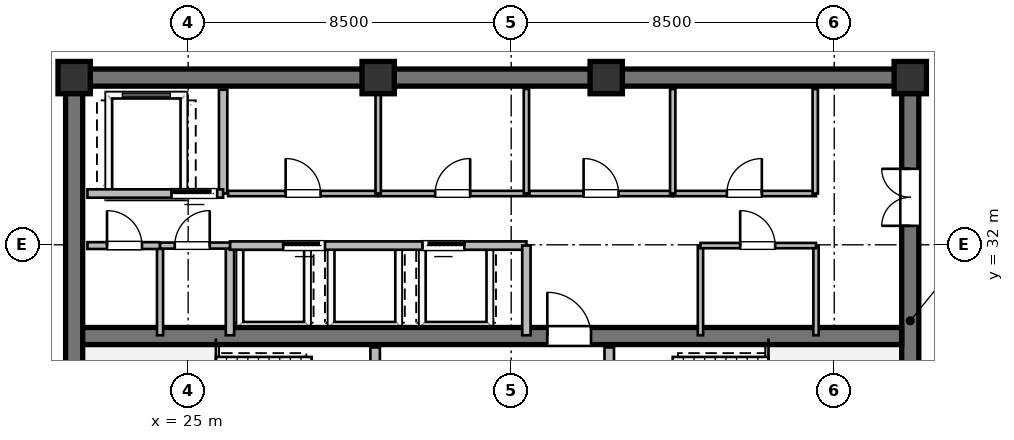
"""IFC4 building model, lengths in metres.
Left out: names, types, materials, properties, quantities, classifications, styles, units other than length and angle.
Written with IfcOpenShell. Run it as: python <this file> out.ifc"""

import sys

from ifc_helpers import new_model, si_unit, direction, frame, frame_2d, origin, origin_2d, place, context, subcontext, project, spatial, rectangle, extrude, element, fill, save


model = new_model("IFC4")
c1 = context("Model", 3, precision=1e-05, world=origin(), true_north=direction((0.0, 1.0)))
c2 = subcontext(c1, "Body", "Model", "MODEL_VIEW")
j1 = project(units=[si_unit("LENGTHUNIT", "METRE"), si_unit("PLANEANGLEUNIT", "RADIAN")], contexts=[c1])
p1 = place(None, origin())
s1 = spatial("IfcSite", under=j1, at=p1, CompositionType="ELEMENT")
p2 = place(p1, origin())
s2 = spatial("IfcBuilding", under=s1, at=p2, CompositionType="ELEMENT")
p3 = place(p2, frame((0.0, 0.0, 213.6)))
s3 = spatial("IfcBuildingStorey", under=s2, at=p3, CompositionType="ELEMENT", Elevation=213.6)
p4 = place(p3, frame((21.775, 36.4, 0.0), z_axis=(0.0, 0.0, 1.0), x_axis=(1.0, 0.0, 0.0)))
e1 = element("IfcWall", 1, at=p4, inside=s3, PredefinedType="SHEAR", context=c2, shape_type="SweptSolid", body=[
    extrude(rectangle(XDim=22.45, YDim=0.45, at=frame_2d((11.225, 0.0))), origin(), (0.0, 0.0, 1.0), 3.36),
])
p5 = place(p3, frame((22.0, 23.825, 0.0), z_axis=(0.0, 0.0, 1.0), x_axis=(0.0, 1.0, 0.0)))
e2 = element("IfcWall", 2, at=p5, inside=s3, PredefinedType="SHEAR", context=c2, shape_type="SweptSolid", body=[
    extrude(rectangle(XDim=12.35, YDim=0.45, at=frame_2d((6.175, 0.0))), origin(), (0.0, 0.0, 1.0), 3.36),
])
p6 = place(p3, frame((44.0, 23.825, 0.0), z_axis=(0.0, 0.0, 1.0), x_axis=(0.0, 1.0, 0.0)))
e3 = element("IfcWall", 3, at=p6, inside=s3, PredefinedType="SHEAR", context=c2, shape_type="SweptSolid", body=[
    extrude(rectangle(XDim=12.35, YDim=0.45, at=frame_2d((6.175, 0.0))), origin(), (0.0, 0.0, 1.0), 3.36),
])
p7 = place(p6, frame((8.675, 0.0, 0.0)))
e4 = element("IfcOpeningElement", 4, at=p7, cuts=e3, PredefinedType="OPENING", context=c2, shape_type="SweptSolid", body=[
    extrude(rectangle(XDim=1.5, YDim=2.15, at=frame_2d((0.75, 1.075))), frame((0.0, 0.235, 0.0), z_axis=(0.0, -1.0, 0.0), x_axis=(1.0, 0.0, 0.0)), (0.0, 0.0, 1.0), 0.47),
])
p8 = place(p3, frame((22.225, 29.6, 0.0), z_axis=(0.0, 0.0, 1.0), x_axis=(1.0, 0.0, 0.0)))
e5 = element("IfcWall", 5, at=p8, inside=s3, PredefinedType="SHEAR", context=c2, shape_type="SweptSolid", body=[
    extrude(rectangle(XDim=21.55, YDim=0.45, at=frame_2d((10.775, 0.0))), origin(), (0.0, 0.0, 1.0), 3.36),
])
p9 = place(p8, frame((12.225, 0.0, 0.0)))
e6 = element("IfcOpeningElement", 6, at=p9, cuts=e5, PredefinedType="OPENING", context=c2, shape_type="SweptSolid", body=[
    extrude(rectangle(XDim=1.15, YDim=2.1, at=frame_2d((0.575, 1.05))), frame((0.0, 0.235, 0.0), z_axis=(0.0, -1.0, 0.0), x_axis=(1.0, 0.0, 0.0)), (0.0, 0.0, 1.0), 0.47),
])
for number, where, z_axis, x_axis in (
    (7, (44.0, 36.4, 0.0), (0.0, 0.0, 1.0), (1.0, 0.0, 0.0)),
    (8, (36.0, 36.4, 0.0), (0.0, 0.0, 1.0), (1.0, 0.0, 0.0)),
    (9, (30.0, 36.4, 0.0), (0.0, 0.0, 1.0), (1.0, 0.0, 0.0)),
    (10, (22.0, 36.4, 0.0), (0.0, 0.0, 1.0), (1.0, 0.0, 0.0)),
):
    element("IfcColumn", number, at=place(p3, frame(where, z_axis=z_axis, x_axis=x_axis)), inside=s3, PredefinedType="COLUMN", context=c2, shape_type="SweptSolid", body=[
        extrude(rectangle(XDim=0.85, YDim=0.85, at=origin_2d()), origin(), (0.0, 0.0, 1.0), 3.6),
    ])
p10 = place(p3, frame((29.92, 23.9, 0.0), z_axis=(0.0, 0.0, 1.0), x_axis=(0.0, 1.0, 0.0)))
e11 = element("IfcWall", 11, at=p10, inside=s3, PredefinedType="SOLIDWALL", context=c2, shape_type="SweptSolid", body=[
    extrude(rectangle(XDim=5.4, YDim=0.25, at=frame_2d((2.7, 0.0))), origin(), (0.0, 0.0, 1.0), 3.36),
])
p11 = place(p10, frame((3.421, 0.0, 0.0)))
e12 = element("IfcOpeningElement", 12, at=p11, cuts=e11, PredefinedType="OPENING", context=c2, shape_type="SweptSolid", body=[
    extrude(rectangle(XDim=1.15, YDim=2.1, at=frame_2d((0.575, 1.05))), frame((0.0, 0.135, 0.0), z_axis=(0.0, -1.0, 0.0), x_axis=(1.0, 0.0, 0.0)), (0.0, 0.0, 1.0), 0.27),
])
p12 = place(p3, frame((36.08, 23.9, 0.0), z_axis=(0.0, 0.0, 1.0), x_axis=(0.0, 1.0, 0.0)))
e13 = element("IfcWall", 13, at=p12, inside=s3, PredefinedType="SOLIDWALL", context=c2, shape_type="SweptSolid", body=[
    extrude(rectangle(XDim=5.4, YDim=0.25, at=frame_2d((2.7, 0.0))), origin(), (0.0, 0.0, 1.0), 3.36),
])
p13 = place(p12, frame((3.421, 0.0, 0.0)))
e14 = element("IfcOpeningElement", 14, at=p13, cuts=e13, PredefinedType="OPENING", context=c2, shape_type="SweptSolid", body=[
    extrude(rectangle(XDim=1.15, YDim=2.1, at=frame_2d((0.575, 1.05))), frame((0.0, 0.135, 0.0), z_axis=(0.0, -1.0, 0.0), x_axis=(1.0, 0.0, 0.0)), (0.0, 0.0, 1.0), 0.27),
])
p14 = place(p3, frame((25.92, 33.35, 0.0), z_axis=(0.0, 0.0, 1.0), x_axis=(0.0, 1.0, 0.0)))
e15 = element("IfcWall", 15, at=p14, inside=s3, PredefinedType="SOLIDWALL", context=c2, shape_type="SweptSolid", body=[
    extrude(rectangle(XDim=2.73, YDim=0.22, at=frame_2d((1.365, 0.0))), origin(), (0.0, 0.0, 1.0), 3.36),
])
p15 = place(p3, frame((22.35, 33.35, 0.0), z_axis=(0.0, 0.0, 1.0), x_axis=(1.0, 0.0, 0.0)))
e16 = element("IfcWall", 16, at=p15, inside=s3, PredefinedType="SOLIDWALL", context=c2, shape_type="SweptSolid", body=[
    extrude(rectangle(XDim=3.57, YDim=0.22, at=frame_2d((1.785, 0.0))), origin(), (0.0, 0.0, 1.0), 3.36),
])
p16 = place(p15, frame((2.213, 0.0, 0.0)))
e17 = element("IfcOpeningElement", 17, at=p16, cuts=e16, PredefinedType="OPENING", context=c2, shape_type="SweptSolid", body=[
    extrude(rectangle(XDim=1.2, YDim=2.1, at=frame_2d((0.6, 1.05))), frame((0.0, 0.12, 0.0), z_axis=(0.0, -1.0, 0.0), x_axis=(1.0, 0.0, 0.0)), (0.0, 0.0, 1.0), 0.24),
])
p17 = place(p3, frame((26.1, 29.62, 0.0), z_axis=(0.0, 0.0, 1.0), x_axis=(0.0, 1.0, 0.0)))
e18 = element("IfcWall", 18, at=p17, inside=s3, PredefinedType="SOLIDWALL", context=c2, shape_type="SweptSolid", body=[
    extrude(rectangle(XDim=2.36, YDim=0.22, at=frame_2d((1.18, 0.0))), origin(), (0.0, 0.0, 1.0), 3.36),
])
p18 = place(p3, frame((26.1, 31.98, 0.0), z_axis=(0.0, 0.0, 1.0), x_axis=(1.0, 0.0, 0.0)))
e19 = element("IfcWall", 19, at=p18, inside=s3, PredefinedType="SOLIDWALL", context=c2, shape_type="SweptSolid", body=[
    extrude(rectangle(XDim=7.8, YDim=0.22, at=frame_2d((3.9, 0.0))), origin(), (0.0, 0.0, 1.0), 3.36),
])
p19 = place(p18, frame((1.4, 0.0, 0.0)))
e20 = element("IfcOpeningElement", 20, at=p19, cuts=e19, PredefinedType="OPENING", context=c2, shape_type="SweptSolid", body=[
    extrude(rectangle(XDim=1.1, YDim=2.1, at=frame_2d((0.55, 1.05))), frame((0.0, 0.12, 0.0), z_axis=(0.0, -1.0, 0.0), x_axis=(1.0, 0.0, 0.0)), (0.0, 0.0, 1.0), 0.24),
])
p20 = place(p18, frame((5.066, 0.0, 0.0)))
e21 = element("IfcOpeningElement", 21, at=p20, cuts=e19, PredefinedType="OPENING", context=c2, shape_type="SweptSolid", body=[
    extrude(rectangle(XDim=1.1, YDim=2.1, at=frame_2d((0.55, 1.05))), frame((0.0, 0.12, 0.0), z_axis=(0.0, -1.0, 0.0), x_axis=(1.0, 0.0, 0.0)), (0.0, 0.0, 1.0), 0.24),
])
p21 = place(p3, frame((33.9, 29.62, 0.0), z_axis=(0.0, 0.0, 1.0), x_axis=(0.0, 1.0, 0.0)))
e22 = element("IfcWall", 22, at=p21, inside=s3, PredefinedType="SOLIDWALL", context=c2, shape_type="SweptSolid", body=[
    extrude(rectangle(XDim=2.36, YDim=0.22, at=frame_2d((1.18, 0.0))), origin(), (0.0, 0.0, 1.0), 3.36),
])
p22 = place(p3, frame((26.05, 33.35, 0.0), z_axis=(0.0, 0.0, 1.0), x_axis=(1.0, 0.0, 0.0)))
e23 = element("IfcWall", 23, at=p22, inside=s3, PredefinedType="PARTITIONING", context=c2, shape_type="SweptSolid", body=[
    extrude(rectangle(XDim=3.95, YDim=0.14, at=frame_2d((1.975, 0.0))), origin(), (0.0, 0.0, 1.0), 3.36),
])
p23 = place(p22, frame((1.515, 0.0, 0.0)))
e24 = element("IfcOpeningElement", 24, at=p23, cuts=e23, PredefinedType="OPENING", context=c2, shape_type="SweptSolid", body=[
    extrude(rectangle(XDim=0.92, YDim=2.1, at=frame_2d((0.46, 1.05))), frame((0.0, 0.08, 0.0), z_axis=(0.0, -1.0, 0.0), x_axis=(1.0, 0.0, 0.0)), (0.0, 0.0, 1.0), 0.16),
])
p24 = place(p3, frame((30.0, 33.35, 0.0), z_axis=(0.0, 0.0, 1.0), x_axis=(1.0, 0.0, 0.0)))
e25 = element("IfcWall", 25, at=p24, inside=s3, PredefinedType="PARTITIONING", context=c2, shape_type="SweptSolid", body=[
    extrude(rectangle(XDim=3.92, YDim=0.14, at=frame_2d((1.96, 0.0))), origin(), (0.0, 0.0, 1.0), 3.36),
])
p25 = place(p24, frame((1.5, 0.0, 0.0)))
e26 = element("IfcOpeningElement", 26, at=p25, cuts=e25, PredefinedType="OPENING", context=c2, shape_type="SweptSolid", body=[
    extrude(rectangle(XDim=0.92, YDim=2.1, at=frame_2d((0.46, 1.05))), frame((0.0, 0.08, 0.0), z_axis=(0.0, -1.0, 0.0), x_axis=(1.0, 0.0, 0.0)), (0.0, 0.0, 1.0), 0.16),
])
for number, where, z_axis, x_axis in (
    (27, (30.0, 33.35, 0.0), (0.0, 0.0, 1.0), (0.0, 1.0, 0.0)),
    (28, (33.9, 33.35, 0.0), (0.0, 0.0, 1.0), (0.0, 1.0, 0.0)),
):
    element("IfcWall", number, at=place(p3, frame(where, z_axis=z_axis, x_axis=x_axis)), inside=s3, PredefinedType="PARTITIONING", context=c2, shape_type="SweptSolid", body=[
        extrude(rectangle(XDim=2.75, YDim=0.14, at=frame_2d((1.375, 0.0))), origin(), (0.0, 0.0, 1.0), 3.36),
    ])
p26 = place(p3, frame((33.98, 33.35, 0.0), z_axis=(0.0, 0.0, 1.0), x_axis=(1.0, 0.0, 0.0)))
e29 = element("IfcWall", 29, at=p26, inside=s3, PredefinedType="PARTITIONING", context=c2, shape_type="SweptSolid", body=[
    extrude(rectangle(XDim=3.77, YDim=0.14, at=frame_2d((1.885, 0.0))), origin(), (0.0, 0.0, 1.0), 3.36),
])
p27 = place(p26, frame((1.425, 0.0, 0.0)))
e30 = element("IfcOpeningElement", 30, at=p27, cuts=e29, PredefinedType="OPENING", context=c2, shape_type="SweptSolid", body=[
    extrude(rectangle(XDim=0.92, YDim=2.1, at=frame_2d((0.46, 1.05))), frame((0.0, 0.08, 0.0), z_axis=(0.0, -1.0, 0.0), x_axis=(1.0, 0.0, 0.0)), (0.0, 0.0, 1.0), 0.16),
])
p28 = place(p3, frame((37.75, 33.35, 0.0), z_axis=(0.0, 0.0, 1.0), x_axis=(1.0, 0.0, 0.0)))
e31 = element("IfcWall", 31, at=p28, inside=s3, PredefinedType="PARTITIONING", context=c2, shape_type="SweptSolid", body=[
    extrude(rectangle(XDim=3.77, YDim=0.14, at=frame_2d((1.885, 0.0))), origin(), (0.0, 0.0, 1.0), 3.36),
])
p29 = place(p28, frame((1.425, 0.0, 0.0)))
e32 = element("IfcOpeningElement", 32, at=p29, cuts=e31, PredefinedType="OPENING", context=c2, shape_type="SweptSolid", body=[
    extrude(rectangle(XDim=0.92, YDim=2.1, at=frame_2d((0.46, 1.05))), frame((0.0, 0.08, 0.0), z_axis=(0.0, -1.0, 0.0), x_axis=(1.0, 0.0, 0.0)), (0.0, 0.0, 1.0), 0.16),
])
for number, where, z_axis, x_axis in (
    (33, (37.75, 33.35, 0.0), (0.0, 0.0, 1.0), (0.0, 1.0, 0.0)),
    (34, (41.5, 33.35, 0.0), (0.0, 0.0, 1.0), (0.0, 1.0, 0.0)),
):
    element("IfcWall", number, at=place(p3, frame(where, z_axis=z_axis, x_axis=x_axis)), inside=s3, PredefinedType="PARTITIONING", context=c2, shape_type="SweptSolid", body=[
        extrude(rectangle(XDim=2.75, YDim=0.14, at=frame_2d((1.375, 0.0))), origin(), (0.0, 0.0, 1.0), 3.36),
    ])
p30 = place(p3, frame((24.26, 29.62, 0.0), z_axis=(0.0, 0.0, 1.0), x_axis=(0.0, 1.0, 0.0)))
e35 = element("IfcWall", 35, at=p30, inside=s3, PredefinedType="PLUMBINGWALL", context=c2, shape_type="SweptSolid", body=[
    extrude(rectangle(XDim=2.36, YDim=0.16, at=frame_2d((1.18, 0.0))), origin(), (0.0, 0.0, 1.0), 3.36),
])
p31 = place(p3, frame((22.35, 31.98, 0.0), z_axis=(0.0, 0.0, 1.0), x_axis=(1.0, 0.0, 0.0)))
e36 = element("IfcWall", 36, at=p31, inside=s3, PredefinedType="PARTITIONING", context=c2, shape_type="SweptSolid", body=[
    extrude(rectangle(XDim=1.91, YDim=0.18, at=frame_2d((0.955, 0.0))), origin(), (0.0, 0.0, 1.0), 3.36),
])
p32 = place(p31, frame((0.515, 0.0, 0.0)))
e37 = element("IfcOpeningElement", 37, at=p32, cuts=e36, PredefinedType="OPENING", context=c2, shape_type="SweptSolid", body=[
    extrude(rectangle(XDim=0.92, YDim=2.1, at=frame_2d((0.46, 1.05))), frame((0.0, 0.1, 0.0), z_axis=(0.0, -1.0, 0.0), x_axis=(1.0, 0.0, 0.0)), (0.0, 0.0, 1.0), 0.2),
])
p33 = place(p3, frame((24.26, 31.98, 0.0), z_axis=(0.0, 0.0, 1.0), x_axis=(1.0, 0.0, 0.0)))
e38 = element("IfcWall", 38, at=p33, inside=s3, PredefinedType="PLUMBINGWALL", context=c2, shape_type="SweptSolid", body=[
    extrude(rectangle(XDim=1.84, YDim=0.16, at=frame_2d((0.92, 0.0))), origin(), (0.0, 0.0, 1.0), 3.36),
])
p34 = place(p33, frame((0.388, 0.0, 0.0)))
e39 = element("IfcOpeningElement", 39, at=p34, cuts=e38, PredefinedType="OPENING", context=c2, shape_type="SweptSolid", body=[
    extrude(rectangle(XDim=0.92, YDim=2.1, at=frame_2d((0.46, 1.05))), frame((0.0, 0.09, 0.0), z_axis=(0.0, -1.0, 0.0), x_axis=(1.0, 0.0, 0.0)), (0.0, 0.0, 1.0), 0.18),
])
for number, where, z_axis, x_axis in (
    (40, (38.48, 29.62, 0.0), (0.0, 0.0, 1.0), (0.0, 1.0, 0.0)),
    (41, (41.52, 29.62, 0.0), (0.0, 0.0, 1.0), (0.0, 1.0, 0.0)),
):
    element("IfcWall", number, at=place(p3, frame(where, z_axis=z_axis, x_axis=x_axis)), inside=s3, PredefinedType="PARTITIONING", context=c2, shape_type="SweptSolid", body=[
        extrude(rectangle(XDim=2.36, YDim=0.14, at=frame_2d((1.18, 0.0))), origin(), (0.0, 0.0, 1.0), 3.36),
    ])
p35 = place(p3, frame((38.48, 31.98, 0.0), z_axis=(0.0, 0.0, 1.0), x_axis=(1.0, 0.0, 0.0)))
e42 = element("IfcWall", 42, at=p35, inside=s3, PredefinedType="PARTITIONING", context=c2, shape_type="SweptSolid", body=[
    extrude(rectangle(XDim=3.04, YDim=0.14, at=frame_2d((1.52, 0.0))), origin(), (0.0, 0.0, 1.0), 3.36),
])
p36 = place(p35, frame((1.045, 0.0, 0.0)))
e43 = element("IfcOpeningElement", 43, at=p36, cuts=e42, PredefinedType="OPENING", context=c2, shape_type="SweptSolid", body=[
    extrude(rectangle(XDim=0.92, YDim=2.1, at=frame_2d((0.46, 1.05))), frame((0.0, 0.08, 0.0), z_axis=(0.0, -1.0, 0.0), x_axis=(1.0, 0.0, 0.0)), (0.0, 0.0, 1.0), 0.16),
])
p37 = place(p9, origin())
e44 = element("IfcDoor", 44, at=p37, inside=s3, OperationType="SINGLE_SWING_LEFT", PredefinedType="DOOR", context=c2, shape_type="SweptSolid", body=[
    extrude(rectangle(XDim=1.15, YDim=2.1, at=frame_2d((0.575, 1.05))), frame((0.0, 0.025, 0.0), z_axis=(0.0, -1.0, 0.0), x_axis=(1.0, 0.0, 0.0)), (0.0, 0.0, 1.0), 0.05),
])
fill(e6, e44)
p38 = place(p7, origin())
e45 = element("IfcDoor", 45, at=p38, inside=s3, OperationType="DOUBLE_DOOR_SINGLE_SWING", PredefinedType="DOOR", context=c2, shape_type="SweptSolid", body=[
    extrude(rectangle(XDim=1.5, YDim=2.15, at=frame_2d((0.75, 1.075))), frame((0.0, 0.025, 0.0), z_axis=(0.0, -1.0, 0.0), x_axis=(1.0, 0.0, 0.0)), (0.0, 0.0, 1.0), 0.05),
])
fill(e4, e45)
p39 = place(p16, origin())
e46 = element("IfcDoor", 46, at=p39, inside=s3, OperationType="SLIDING_TO_LEFT", PredefinedType="DOOR", context=c2, shape_type="SweptSolid", body=[
    extrude(rectangle(XDim=1.2, YDim=2.1, at=frame_2d((0.6, 1.05))), frame((0.0, 0.025, 0.0), z_axis=(0.0, -1.0, 0.0), x_axis=(1.0, 0.0, 0.0)), (0.0, 0.0, 1.0), 0.05),
])
fill(e17, e46)
p40 = place(p19, origin())
e47 = element("IfcDoor", 47, at=p40, inside=s3, OperationType="SLIDING_TO_LEFT", PredefinedType="DOOR", context=c2, shape_type="SweptSolid", body=[
    extrude(rectangle(XDim=1.1, YDim=2.1, at=frame_2d((0.55, 1.05))), frame((0.0, 0.025, 0.0), z_axis=(0.0, -1.0, 0.0), x_axis=(1.0, 0.0, 0.0)), (0.0, 0.0, 1.0), 0.05),
])
fill(e20, e47)
p41 = place(p20, origin())
e48 = element("IfcDoor", 48, at=p41, inside=s3, OperationType="SLIDING_TO_RIGHT", PredefinedType="DOOR", context=c2, shape_type="SweptSolid", body=[
    extrude(rectangle(XDim=1.1, YDim=2.1, at=frame_2d((0.55, 1.05))), frame((0.0, 0.025, 0.0), z_axis=(0.0, -1.0, 0.0), x_axis=(1.0, 0.0, 0.0)), (0.0, 0.0, 1.0), 0.05),
])
fill(e21, e48)
p42 = place(p23, origin())
e49 = element("IfcDoor", 49, at=p42, inside=s3, OperationType="SINGLE_SWING_LEFT", PredefinedType="DOOR", context=c2, shape_type="SweptSolid", body=[
    extrude(rectangle(XDim=0.92, YDim=2.1, at=frame_2d((0.46, 1.05))), frame((0.0, 0.025, 0.0), z_axis=(0.0, -1.0, 0.0), x_axis=(1.0, 0.0, 0.0)), (0.0, 0.0, 1.0), 0.05),
])
fill(e24, e49)
p43 = place(p25, origin())
e50 = element("IfcDoor", 50, at=p43, inside=s3, OperationType="SINGLE_SWING_RIGHT", PredefinedType="DOOR", context=c2, shape_type="SweptSolid", body=[
    extrude(rectangle(XDim=0.92, YDim=2.1, at=frame_2d((0.46, 1.05))), frame((0.0, 0.025, 0.0), z_axis=(0.0, -1.0, 0.0), x_axis=(1.0, 0.0, 0.0)), (0.0, 0.0, 1.0), 0.05),
])
fill(e26, e50)
p44 = place(p27, origin())
e51 = element("IfcDoor", 51, at=p44, inside=s3, OperationType="SINGLE_SWING_LEFT", PredefinedType="DOOR", context=c2, shape_type="SweptSolid", body=[
    extrude(rectangle(XDim=0.92, YDim=2.1, at=frame_2d((0.46, 1.05))), frame((0.0, 0.025, 0.0), z_axis=(0.0, -1.0, 0.0), x_axis=(1.0, 0.0, 0.0)), (0.0, 0.0, 1.0), 0.05),
])
fill(e30, e51)
p45 = place(p29, origin())
e52 = element("IfcDoor", 52, at=p45, inside=s3, OperationType="SINGLE_SWING_RIGHT", PredefinedType="DOOR", context=c2, shape_type="SweptSolid", body=[
    extrude(rectangle(XDim=0.92, YDim=2.1, at=frame_2d((0.46, 1.05))), frame((0.0, 0.025, 0.0), z_axis=(0.0, -1.0, 0.0), x_axis=(1.0, 0.0, 0.0)), (0.0, 0.0, 1.0), 0.05),
])
fill(e32, e52)
p46 = place(p32, origin())
e53 = element("IfcDoor", 53, at=p46, inside=s3, OperationType="SINGLE_SWING_LEFT", PredefinedType="DOOR", context=c2, shape_type="SweptSolid", body=[
    extrude(rectangle(XDim=0.92, YDim=2.1, at=frame_2d((0.46, 1.05))), frame((0.0, 0.025, 0.0), z_axis=(0.0, -1.0, 0.0), x_axis=(1.0, 0.0, 0.0)), (0.0, 0.0, 1.0), 0.05),
])
fill(e37, e53)
p47 = place(p34, origin())
e54 = element("IfcDoor", 54, at=p47, inside=s3, OperationType="SINGLE_SWING_RIGHT", PredefinedType="DOOR", context=c2, shape_type="SweptSolid", body=[
    extrude(rectangle(XDim=0.92, YDim=2.1, at=frame_2d((0.46, 1.05))), frame((0.0, 0.025, 0.0), z_axis=(0.0, -1.0, 0.0), x_axis=(1.0, 0.0, 0.0)), (0.0, 0.0, 1.0), 0.05),
])
fill(e39, e54)
p48 = place(p36, origin())
e55 = element("IfcDoor", 55, at=p48, inside=s3, OperationType="SINGLE_SWING_LEFT", PredefinedType="DOOR", context=c2, shape_type="SweptSolid", body=[
    extrude(rectangle(XDim=0.92, YDim=2.1, at=frame_2d((0.46, 1.05))), frame((0.0, 0.025, 0.0), z_axis=(0.0, -1.0, 0.0), x_axis=(1.0, 0.0, 0.0)), (0.0, 0.0, 1.0), 0.05),
])
fill(e43, e55)
save(model, sys.argv[1])
